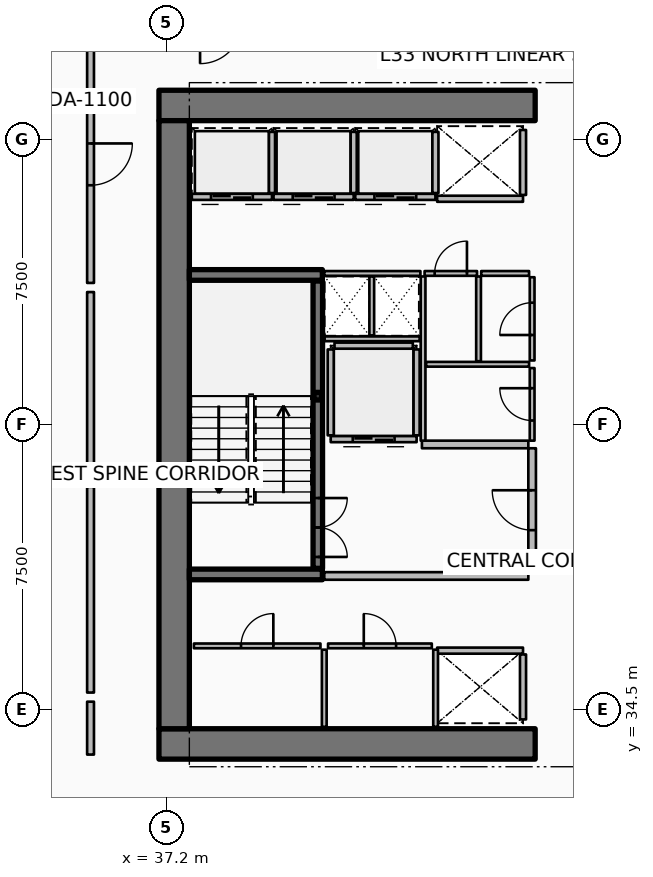
"""IFC4 building model, lengths in metres.
Left out: names, types, materials, properties, quantities, classifications, styles, units other than length and angle.
Written with IfcOpenShell. Run it as: python <this file> out.ifc"""

import sys

from ifc_helpers import new_model, si_unit, direction, frame, frame_2d, origin, origin_2d, place, context, subcontext, project, spatial, rectangle, hollow_rectangle, extrude, element, fill, save


model = new_model("IFC4")
c1 = context("Model", 3, precision=1e-05, world=origin(), true_north=direction((0.0, 1.0)))
c2 = subcontext(c1, "Body", "Model", "MODEL_VIEW")
j1 = project(units=[si_unit("LENGTHUNIT", "METRE"), si_unit("PLANEANGLEUNIT", "RADIAN")], contexts=[c1])
p1 = place(None, origin())
s1 = spatial("IfcSite", under=j1, at=p1, CompositionType="ELEMENT")
p2 = place(p1, origin())
s2 = spatial("IfcBuilding", under=s1, at=p2, CompositionType="ELEMENT")
p3 = place(p2, frame((0.0, 0.0, 135.3)))
s3 = spatial("IfcBuildingStorey", under=s2, at=p3, CompositionType="ELEMENT", Elevation=135.3)
for number, where, z_axis, x_axis in (
    (1, (37.0, 33.6, 0.0), (0.0, 0.0, 1.0), (1.0, 0.0, 0.0)),
    (2, (37.0, 50.4, 0.0), (0.0, 0.0, 1.0), (1.0, 0.0, 0.0)),
):
    element("IfcWall", number, at=place(p3, frame(where, z_axis=z_axis, x_axis=x_axis)), inside=s3, PredefinedType="SHEAR", context=c2, shape_type="SweptSolid", body=[
        extrude(rectangle(XDim=9.9, YDim=0.8, at=frame_2d((4.95, 0.0))), origin(), (0.0, 0.0, 1.0), 3.75),
    ])
p4 = place(p3, frame((37.4, 34.0, 0.0), z_axis=(0.0, 0.0, 1.0), x_axis=(0.0, 1.0, 0.0)))
e3 = element("IfcWall", 3, at=p4, inside=s3, PredefinedType="SHEAR", context=c2, shape_type="SweptSolid", body=[
    extrude(rectangle(XDim=16.0, YDim=0.8, at=frame_2d((8.0, 0.0))), origin(), (0.0, 0.0, 1.0), 3.75),
])
for number, where, z_axis, x_axis in (
    (4, (37.8, 38.06, 0.0), (0.0, 0.0, 1.0), (1.0, 0.0, 0.0)),
    (5, (37.8, 45.94, 0.0), (0.0, 0.0, 1.0), (1.0, 0.0, 0.0)),
):
    element("IfcWall", number, at=place(p3, frame(where, z_axis=z_axis, x_axis=x_axis)), inside=s3, PredefinedType="SHEAR", context=c2, shape_type="SweptSolid", body=[
        extrude(rectangle(XDim=3.5, YDim=0.28, at=frame_2d((1.75, 0.0))), origin(), (0.0, 0.0, 1.0), 3.75),
    ])
p5 = place(p3, frame((41.18, 42.75, 0.0), z_axis=(0.0, 0.0, 1.0), x_axis=(1.0, 0.0, 0.0)))
e6 = element("IfcColumn", 6, at=p5, inside=s3, PredefinedType="COLUMN", context=c2, shape_type="SweptSolid", body=[
    extrude(hollow_rectangle(XDim=0.2, YDim=0.2, WallThickness=0.01, InnerFilletRadius=0.01, OuterFilletRadius=0.02, at=origin_2d()), origin(), (0.0, 0.0, 1.0), 1.67),
])
p6 = place(p3, frame((41.18, 38.22, 0.0), z_axis=(0.0, 0.0, 1.0), x_axis=(0.0, 1.0, 0.0)))
e7 = element("IfcWall", 7, at=p6, inside=s3, PredefinedType="SOLIDWALL", context=c2, shape_type="SweptSolid", body=[
    extrude(rectangle(XDim=7.56, YDim=0.25, at=frame_2d((3.78, 0.0))), origin(), (0.0, 0.0, 1.0), 3.5),
])
p7 = place(p6, frame((0.3, 0.0, 0.0)))
e8 = element("IfcOpeningElement", 8, at=p7, cuts=e7, PredefinedType="OPENING", context=c2, shape_type="SweptSolid", body=[
    extrude(rectangle(XDim=1.55, YDim=2.15, at=frame_2d((0.775, 1.075))), frame((0.0, 0.135, 0.0), z_axis=(0.0, -1.0, 0.0), x_axis=(1.0, 0.0, 0.0)), (0.0, 0.0, 1.0), 0.27),
])
p8 = place(p3, frame((39.975, 47.995, 0.0), z_axis=(0.0, 0.0, 1.0), x_axis=(-1.0, 0.0, 0.0)))
e9 = element("IfcWall", 9, at=p8, inside=s3, PredefinedType="PARTITIONING", context=c2, shape_type="SweptSolid", body=[
    extrude(rectangle(XDim=2.11, YDim=0.16, at=frame_2d((1.055, 0.0))), origin(), (0.0, 0.0, 1.0), 3.5),
])
p9 = place(p8, frame((0.505, 0.0, 0.0)))
e10 = element("IfcOpeningElement", 10, at=p9, cuts=e9, PredefinedType="OPENING", context=c2, shape_type="SweptSolid", body=[
    extrude(rectangle(XDim=1.1, YDim=2.1, at=frame_2d((0.55, 1.05))), frame((0.0, 0.09, 0.0), z_axis=(0.0, -1.0, 0.0), x_axis=(1.0, 0.0, 0.0)), (0.0, 0.0, 1.0), 0.18),
])
p10 = place(p3, frame((39.975, 48.095, 0.0), z_axis=(0.0, 0.0, 1.0), x_axis=(0.0, 1.0, 0.0)))
e11 = element("IfcWall", 11, at=p10, inside=s3, PredefinedType="PARTITIONING", context=c2, shape_type="SweptSolid", body=[
    extrude(rectangle(XDim=1.61, YDim=0.16, at=frame_2d((0.805, 0.0))), origin(), (0.0, 0.0, 1.0), 3.5),
])
p11 = place(p3, frame((42.125, 47.995, 0.0), z_axis=(0.0, 0.0, 1.0), x_axis=(-1.0, 0.0, 0.0)))
e12 = element("IfcWall", 12, at=p11, inside=s3, PredefinedType="PARTITIONING", context=c2, shape_type="SweptSolid", body=[
    extrude(rectangle(XDim=2.11, YDim=0.16, at=frame_2d((1.055, 0.0))), origin(), (0.0, 0.0, 1.0), 3.5),
])
p12 = place(p11, frame((0.505, 0.0, 0.0)))
e13 = element("IfcOpeningElement", 13, at=p12, cuts=e12, PredefinedType="OPENING", context=c2, shape_type="SweptSolid", body=[
    extrude(rectangle(XDim=1.1, YDim=2.1, at=frame_2d((0.55, 1.05))), frame((0.0, 0.09, 0.0), z_axis=(0.0, -1.0, 0.0), x_axis=(1.0, 0.0, 0.0)), (0.0, 0.0, 1.0), 0.18),
])
p13 = place(p3, frame((42.125, 48.095, 0.0), z_axis=(0.0, 0.0, 1.0), x_axis=(0.0, 1.0, 0.0)))
e14 = element("IfcWall", 14, at=p13, inside=s3, PredefinedType="PARTITIONING", context=c2, shape_type="SweptSolid", body=[
    extrude(rectangle(XDim=1.61, YDim=0.16, at=frame_2d((0.805, 0.0))), origin(), (0.0, 0.0, 1.0), 3.5),
])
p14 = place(p3, frame((44.275, 47.995, 0.0), z_axis=(0.0, 0.0, 1.0), x_axis=(-1.0, 0.0, 0.0)))
e15 = element("IfcWall", 15, at=p14, inside=s3, PredefinedType="PARTITIONING", context=c2, shape_type="SweptSolid", body=[
    extrude(rectangle(XDim=2.11, YDim=0.16, at=frame_2d((1.055, 0.0))), origin(), (0.0, 0.0, 1.0), 3.5),
])
p15 = place(p14, frame((0.505, 0.0, 0.0)))
e16 = element("IfcOpeningElement", 16, at=p15, cuts=e15, PredefinedType="OPENING", context=c2, shape_type="SweptSolid", body=[
    extrude(rectangle(XDim=1.1, YDim=2.1, at=frame_2d((0.55, 1.05))), frame((0.0, 0.09, 0.0), z_axis=(0.0, -1.0, 0.0), x_axis=(1.0, 0.0, 0.0)), (0.0, 0.0, 1.0), 0.18),
])
p16 = place(p3, frame((44.275, 48.095, 0.0), z_axis=(0.0, 0.0, 1.0), x_axis=(0.0, 1.0, 0.0)))
e17 = element("IfcWall", 17, at=p16, inside=s3, PredefinedType="PARTITIONING", context=c2, shape_type="SweptSolid", body=[
    extrude(rectangle(XDim=1.61, YDim=0.16, at=frame_2d((0.805, 0.0))), origin(), (0.0, 0.0, 1.0), 3.5),
])
p17 = place(p3, frame((46.58, 47.945, 0.0), z_axis=(0.0, 0.0, 1.0), x_axis=(-1.0, 0.0, 0.0)))
e18 = element("IfcWall", 18, at=p17, inside=s3, PredefinedType="PARTITIONING", context=c2, shape_type="SweptSolid", body=[
    extrude(rectangle(XDim=2.26, YDim=0.16, at=frame_2d((1.13, 0.0))), origin(), (0.0, 0.0, 1.0), 3.5),
])
p18 = place(p3, frame((46.58, 48.045, 0.0), z_axis=(0.0, 0.0, 1.0), x_axis=(0.0, 1.0, 0.0)))
e19 = element("IfcWall", 19, at=p18, inside=s3, PredefinedType="PARTITIONING", context=c2, shape_type="SweptSolid", body=[
    extrude(rectangle(XDim=1.71, YDim=0.16, at=frame_2d((0.855, 0.0))), origin(), (0.0, 0.0, 1.0), 3.5),
])
p19 = place(p3, frame((44.32, 36.055, 0.0), z_axis=(0.0, 0.0, 1.0), x_axis=(1.0, 0.0, 0.0)))
e20 = element("IfcWall", 20, at=p19, inside=s3, PredefinedType="PARTITIONING", context=c2, shape_type="SweptSolid", body=[
    extrude(rectangle(XDim=2.26, YDim=0.16, at=frame_2d((1.13, 0.0))), origin(), (0.0, 0.0, 1.0), 3.5),
])
p20 = place(p3, frame((46.58, 34.245, 0.0), z_axis=(0.0, 0.0, 1.0), x_axis=(0.0, 1.0, 0.0)))
e21 = element("IfcWall", 21, at=p20, inside=s3, PredefinedType="PARTITIONING", context=c2, shape_type="SweptSolid", body=[
    extrude(rectangle(XDim=1.71, YDim=0.16, at=frame_2d((0.855, 0.0))), origin(), (0.0, 0.0, 1.0), 3.5),
])
p21 = place(p3, frame((43.78, 41.62, 0.0), z_axis=(0.0, 0.0, 1.0), x_axis=(-1.0, 0.0, 0.0)))
e22 = element("IfcWall", 22, at=p21, inside=s3, PredefinedType="PARTITIONING", context=c2, shape_type="SweptSolid", body=[
    extrude(rectangle(XDim=2.26, YDim=0.16, at=frame_2d((1.13, 0.0))), origin(), (0.0, 0.0, 1.0), 3.5),
])
p22 = place(p21, frame((0.58, 0.0, 0.0)))
e23 = element("IfcOpeningElement", 23, at=p22, cuts=e22, PredefinedType="OPENING", context=c2, shape_type="SweptSolid", body=[
    extrude(rectangle(XDim=1.1, YDim=2.1, at=frame_2d((0.55, 1.05))), frame((0.0, 0.09, 0.0), z_axis=(0.0, -1.0, 0.0), x_axis=(1.0, 0.0, 0.0)), (0.0, 0.0, 1.0), 0.18),
])
for number, where, z_axis, x_axis in (
    (24, (43.78, 41.72, 0.0), (0.0, 0.0, 1.0), (0.0, 1.0, 0.0)),
    (25, (41.52, 41.72, 0.0), (0.0, 0.0, 1.0), (0.0, 1.0, 0.0)),
):
    element("IfcWall", number, at=place(p3, frame(where, z_axis=z_axis, x_axis=x_axis)), inside=s3, PredefinedType="PARTITIONING", context=c2, shape_type="SweptSolid", body=[
        extrude(rectangle(XDim=2.26, YDim=0.16, at=frame_2d((1.13, 0.0))), origin(), (0.0, 0.0, 1.0), 3.5),
    ])
p23 = place(p3, frame((41.62, 44.08, 0.0), z_axis=(0.0, 0.0, 1.0), x_axis=(1.0, 0.0, 0.0)))
e26 = element("IfcWall", 26, at=p23, inside=s3, PredefinedType="PARTITIONING", context=c2, shape_type="SweptSolid", body=[
    extrude(rectangle(XDim=2.06, YDim=0.16, at=frame_2d((1.03, 0.0))), origin(), (0.0, 0.0, 1.0), 3.5),
])
for number, where, z_axis, x_axis in (
    (27, (44.28, 34.05, 0.0), (0.0, 0.0, 1.0), (0.0, 1.0, 0.0)),
    (28, (41.35, 34.05, 0.0), (0.0, 0.0, 1.0), (0.0, 1.0, 0.0)),
):
    element("IfcWall", number, at=place(p3, frame(where, z_axis=z_axis, x_axis=x_axis)), inside=s3, PredefinedType="PARTITIONING", context=c2, shape_type="SweptSolid", body=[
        extrude(rectangle(XDim=2.03, YDim=0.125, at=frame_2d((1.015, 0.0))), origin(), (0.0, 0.0, 1.0), 2.94),
    ])
p24 = place(p3, frame((37.92, 36.18, 0.0), z_axis=(0.0, 0.0, 1.0), x_axis=(1.0, 0.0, 0.0)))
e29 = element("IfcWall", 29, at=p24, inside=s3, PredefinedType="PARTITIONING", context=c2, shape_type="SweptSolid", body=[
    extrude(rectangle(XDim=3.33, YDim=0.125, at=frame_2d((1.665, 0.0))), origin(), (0.0, 0.0, 1.0), 2.94),
])
p25 = place(p24, frame((1.24, 0.0, 0.0)))
e30 = element("IfcOpeningElement", 30, at=p25, cuts=e29, PredefinedType="OPENING", context=c2, shape_type="SweptSolid", body=[
    extrude(rectangle(XDim=0.85, YDim=2.06, at=frame_2d((0.425, 1.03))), frame((0.0, 0.073, 0.0), z_axis=(0.0, -1.0, 0.0), x_axis=(1.0, 0.0, 0.0)), (0.0, 0.0, 1.0), 0.145),
])
p26 = place(p3, frame((41.45, 36.18, 0.0), z_axis=(0.0, 0.0, 1.0), x_axis=(1.0, 0.0, 0.0)))
e31 = element("IfcWall", 31, at=p26, inside=s3, PredefinedType="PARTITIONING", context=c2, shape_type="SweptSolid", body=[
    extrude(rectangle(XDim=2.73, YDim=0.125, at=frame_2d((1.365, 0.0))), origin(), (0.0, 0.0, 1.0), 2.94),
])
p27 = place(p26, frame((0.94, 0.0, 0.0)))
e32 = element("IfcOpeningElement", 32, at=p27, cuts=e31, PredefinedType="OPENING", context=c2, shape_type="SweptSolid", body=[
    extrude(rectangle(XDim=0.85, YDim=2.06, at=frame_2d((0.425, 1.03))), frame((0.0, 0.073, 0.0), z_axis=(0.0, -1.0, 0.0), x_axis=(1.0, 0.0, 0.0)), (0.0, 0.0, 1.0), 0.145),
])
p28 = place(p3, frame((41.35, 38.02, 0.0), z_axis=(0.0, 0.0, 1.0), x_axis=(1.0, 0.0, 0.0)))
e33 = element("IfcWall", 33, at=p28, inside=s3, PredefinedType="PARTITIONING", context=c2, shape_type="SweptSolid", body=[
    extrude(rectangle(XDim=5.37, YDim=0.2, at=frame_2d((2.685, 0.0))), origin(), (0.0, 0.0, 1.0), 3.5),
])
p29 = place(p3, frame((43.92, 41.48, 0.0), z_axis=(0.0, 0.0, 1.0), x_axis=(1.0, 0.0, 0.0)))
e34 = element("IfcWall", 34, at=p29, inside=s3, PredefinedType="PARTITIONING", context=c2, shape_type="SweptSolid", body=[
    extrude(rectangle(XDim=2.8, YDim=0.2, at=frame_2d((1.4, 0.0))), origin(), (0.0, 0.0, 1.0), 3.5),
])
p30 = place(p3, frame((46.82, 38.12, 0.0), z_axis=(0.0, 0.0, 1.0), x_axis=(0.0, 1.0, 0.0)))
e35 = element("IfcWall", 35, at=p30, inside=s3, PredefinedType="PARTITIONING", context=c2, shape_type="SweptSolid", body=[
    extrude(rectangle(XDim=3.26, YDim=0.2, at=frame_2d((1.63, 0.0))), origin(), (0.0, 0.0, 1.0), 3.5),
])
p31 = place(p30, frame((1.105, 0.0, 0.0)))
e36 = element("IfcOpeningElement", 36, at=p31, cuts=e35, PredefinedType="OPENING", context=c2, shape_type="SweptSolid", body=[
    extrude(rectangle(XDim=1.05, YDim=2.1, at=frame_2d((0.525, 1.05))), frame((0.0, 0.11, 0.0), z_axis=(0.0, -1.0, 0.0), x_axis=(1.0, 0.0, 0.0)), (0.0, 0.0, 1.0), 0.22),
])
p32 = place(p3, frame((41.36, 44.26, 0.0), z_axis=(0.0, 0.0, 1.0), x_axis=(1.0, 0.0, 0.0)))
e37 = element("IfcWall", 37, at=p32, inside=s3, PredefinedType="PARTITIONING", context=c2, shape_type="SweptSolid", body=[
    extrude(rectangle(XDim=2.5, YDim=0.125, at=frame_2d((1.25, 0.0))), origin(), (0.0, 0.0, 1.0), 2.94),
])
p33 = place(p3, frame((42.6, 44.35, 0.0), z_axis=(0.0, 0.0, 1.0), x_axis=(0.0, 1.0, 0.0)))
e38 = element("IfcWall", 38, at=p33, inside=s3, PredefinedType="PARTITIONING", context=c2, shape_type="SweptSolid", body=[
    extrude(rectangle(XDim=1.55, YDim=0.125, at=frame_2d((0.775, 0.0))), origin(), (0.0, 0.0, 1.0), 2.94),
])
p34 = place(p3, frame((43.95, 41.58, 0.0), z_axis=(0.0, 0.0, 1.0), x_axis=(0.0, 1.0, 0.0)))
e39 = element("IfcWall", 39, at=p34, inside=s3, PredefinedType="PARTITIONING", context=c2, shape_type="SweptSolid", body=[
    extrude(rectangle(XDim=4.32, YDim=0.125, at=frame_2d((2.16, 0.0))), origin(), (0.0, 0.0, 1.0), 2.94),
])
p35 = place(p3, frame((44.03, 43.59, 0.0), z_axis=(0.0, 0.0, 1.0), x_axis=(1.0, 0.0, 0.0)))
e40 = element("IfcWall", 40, at=p35, inside=s3, PredefinedType="PARTITIONING", context=c2, shape_type="SweptSolid", body=[
    extrude(rectangle(XDim=2.71, YDim=0.125, at=frame_2d((1.355, 0.0))), origin(), (0.0, 0.0, 1.0), 2.94),
])
p36 = place(p3, frame((45.41, 43.67, 0.0), z_axis=(0.0, 0.0, 1.0), x_axis=(0.0, 1.0, 0.0)))
e41 = element("IfcWall", 41, at=p36, inside=s3, PredefinedType="PARTITIONING", context=c2, shape_type="SweptSolid", body=[
    extrude(rectangle(XDim=2.23, YDim=0.125, at=frame_2d((1.115, 0.0))), origin(), (0.0, 0.0, 1.0), 2.94),
])
p37 = place(p3, frame((46.82, 41.58, 0.0), z_axis=(0.0, 0.0, 1.0), x_axis=(0.0, 1.0, 0.0)))
e42 = element("IfcWall", 42, at=p37, inside=s3, PredefinedType="PARTITIONING", context=c2, shape_type="SweptSolid", body=[
    extrude(rectangle(XDim=1.91, YDim=0.125, at=frame_2d((0.955, 0.0))), origin(), (0.0, 0.0, 1.0), 2.94),
])
p38 = place(p37, frame((0.53, 0.0, 0.0)))
e43 = element("IfcOpeningElement", 43, at=p38, cuts=e42, PredefinedType="OPENING", context=c2, shape_type="SweptSolid", body=[
    extrude(rectangle(XDim=0.85, YDim=2.06, at=frame_2d((0.425, 1.03))), frame((0.0, 0.073, 0.0), z_axis=(0.0, -1.0, 0.0), x_axis=(1.0, 0.0, 0.0)), (0.0, 0.0, 1.0), 0.145),
])
p39 = place(p3, frame((46.82, 43.69, 0.0), z_axis=(0.0, 0.0, 1.0), x_axis=(0.0, 1.0, 0.0)))
e44 = element("IfcWall", 44, at=p39, inside=s3, PredefinedType="PARTITIONING", context=c2, shape_type="SweptSolid", body=[
    extrude(rectangle(XDim=2.19, YDim=0.125, at=frame_2d((1.095, 0.0))), origin(), (0.0, 0.0, 1.0), 2.94),
])
p40 = place(p39, frame((0.67, 0.0, 0.0)))
e45 = element("IfcOpeningElement", 45, at=p40, cuts=e44, PredefinedType="OPENING", context=c2, shape_type="SweptSolid", body=[
    extrude(rectangle(XDim=0.85, YDim=2.06, at=frame_2d((0.425, 1.03))), frame((0.0, 0.073, 0.0), z_axis=(0.0, -1.0, 0.0), x_axis=(1.0, 0.0, 0.0)), (0.0, 0.0, 1.0), 0.145),
])
p41 = place(p3, frame((41.35, 45.98, 0.0), z_axis=(0.0, 0.0, 1.0), x_axis=(1.0, 0.0, 0.0)))
e46 = element("IfcWall", 46, at=p41, inside=s3, PredefinedType="PARTITIONING", context=c2, shape_type="SweptSolid", body=[
    extrude(rectangle(XDim=2.53, YDim=0.125, at=frame_2d((1.265, 0.0))), origin(), (0.0, 0.0, 1.0), 2.94),
])
p42 = place(p3, frame((43.99, 45.98, 0.0), z_axis=(0.0, 0.0, 1.0), x_axis=(1.0, 0.0, 0.0)))
e47 = element("IfcWall", 47, at=p42, inside=s3, PredefinedType="PARTITIONING", context=c2, shape_type="SweptSolid", body=[
    extrude(rectangle(XDim=1.38, YDim=0.125, at=frame_2d((0.69, 0.0))), origin(), (0.0, 0.0, 1.0), 2.94),
])
p43 = place(p42, frame((0.265, 0.0, 0.0)))
e48 = element("IfcOpeningElement", 48, at=p43, cuts=e47, PredefinedType="OPENING", context=c2, shape_type="SweptSolid", body=[
    extrude(rectangle(XDim=0.85, YDim=2.06, at=frame_2d((0.425, 1.03))), frame((0.0, 0.073, 0.0), z_axis=(0.0, -1.0, 0.0), x_axis=(1.0, 0.0, 0.0)), (0.0, 0.0, 1.0), 0.145),
])
p44 = place(p3, frame((45.48, 45.98, 0.0), z_axis=(0.0, 0.0, 1.0), x_axis=(1.0, 0.0, 0.0)))
e49 = element("IfcWall", 49, at=p44, inside=s3, PredefinedType="PARTITIONING", context=c2, shape_type="SweptSolid", body=[
    extrude(rectangle(XDim=1.26, YDim=0.125, at=frame_2d((0.63, 0.0))), origin(), (0.0, 0.0, 1.0), 2.94),
])
p45 = place(p3, frame((35.2, 51.971, 0.0), z_axis=(0.0, 0.0, 1.0), x_axis=(0.0, -1.0, 0.0)))
e50 = element("IfcWall", 50, at=p45, inside=s3, PredefinedType="PARTITIONING", context=c2, shape_type="SweptSolid", body=[
    extrude(rectangle(XDim=6.241, YDim=0.18, at=frame_2d((3.12, 0.0))), origin(), (0.0, 0.0, 1.0), 2.94),
])
p46 = place(p45, frame((2.57, 0.0, 0.0)))
e51 = element("IfcOpeningElement", 51, at=p46, cuts=e50, PredefinedType="OPENING", context=c2, shape_type="SweptSolid", body=[
    extrude(rectangle(XDim=1.1, YDim=2.1, at=frame_2d((0.55, 1.05))), frame((0.0, 0.1, 0.0), z_axis=(0.0, -1.0, 0.0), x_axis=(1.0, 0.0, 0.0)), (0.0, 0.0, 1.0), 0.2),
])
p47 = place(p3, frame((35.2, 45.49, 0.0), z_axis=(0.0, 0.0, 1.0), x_axis=(0.0, -1.0, 0.0)))
e52 = element("IfcWall", 52, at=p47, inside=s3, PredefinedType="PARTITIONING", context=c2, shape_type="SweptSolid", body=[
    extrude(rectangle(XDim=4.885, YDim=0.18, at=frame_2d((2.442, 0.0))), origin(), (0.0, 0.0, 1.0), 2.94),
])
p48 = place(p3, frame((35.2, 40.365, 0.0), z_axis=(0.0, 0.0, 1.0), x_axis=(0.0, -1.0, 0.0)))
e53 = element("IfcWall", 53, at=p48, inside=s3, PredefinedType="PARTITIONING", context=c2, shape_type="SweptSolid", body=[
    extrude(rectangle(XDim=5.413, YDim=0.18, at=frame_2d((2.707, 0.0))), origin(), (0.0, 0.0, 1.0), 2.94),
])
p49 = place(p3, frame((35.2, 34.712, 0.0), z_axis=(0.0, 0.0, 1.0), x_axis=(0.0, -1.0, 0.0)))
e54 = element("IfcWall", 54, at=p49, inside=s3, PredefinedType="PARTITIONING", context=c2, shape_type="SweptSolid", body=[
    extrude(rectangle(XDim=1.392, YDim=0.18, at=frame_2d((0.696, 0.0))), origin(), (0.0, 0.0, 1.0), 2.94),
])
p50 = place(p7, origin())
e55 = element("IfcDoor", 55, at=p50, inside=s3, OperationType="DOUBLE_DOOR_SINGLE_SWING", PredefinedType="DOOR", context=c2, shape_type="SweptSolid", body=[
    extrude(rectangle(XDim=1.55, YDim=2.15, at=frame_2d((0.775, 1.075))), frame((0.0, 0.025, 0.0), z_axis=(0.0, -1.0, 0.0), x_axis=(1.0, 0.0, 0.0)), (0.0, 0.0, 1.0), 0.05),
])
fill(e8, e55)
p51 = place(p9, origin())
e56 = element("IfcDoor", 56, at=p51, inside=s3, OperationType="DOUBLE_DOOR_SLIDING", PredefinedType="DOOR", context=c2, shape_type="SweptSolid", body=[
    extrude(rectangle(XDim=1.1, YDim=2.1, at=frame_2d((0.55, 1.05))), frame((0.0, 0.025, 0.0), z_axis=(0.0, -1.0, 0.0), x_axis=(1.0, 0.0, 0.0)), (0.0, 0.0, 1.0), 0.05),
])
fill(e10, e56)
p52 = place(p12, origin())
e57 = element("IfcDoor", 57, at=p52, inside=s3, OperationType="DOUBLE_DOOR_SLIDING", PredefinedType="DOOR", context=c2, shape_type="SweptSolid", body=[
    extrude(rectangle(XDim=1.1, YDim=2.1, at=frame_2d((0.55, 1.05))), frame((0.0, 0.025, 0.0), z_axis=(0.0, -1.0, 0.0), x_axis=(1.0, 0.0, 0.0)), (0.0, 0.0, 1.0), 0.05),
])
fill(e13, e57)
p53 = place(p15, origin())
e58 = element("IfcDoor", 58, at=p53, inside=s3, OperationType="DOUBLE_DOOR_SLIDING", PredefinedType="DOOR", context=c2, shape_type="SweptSolid", body=[
    extrude(rectangle(XDim=1.1, YDim=2.1, at=frame_2d((0.55, 1.05))), frame((0.0, 0.025, 0.0), z_axis=(0.0, -1.0, 0.0), x_axis=(1.0, 0.0, 0.0)), (0.0, 0.0, 1.0), 0.05),
])
fill(e16, e58)
p54 = place(p22, origin())
e59 = element("IfcDoor", 59, at=p54, inside=s3, OperationType="DOUBLE_DOOR_SLIDING", PredefinedType="DOOR", context=c2, shape_type="SweptSolid", body=[
    extrude(rectangle(XDim=1.1, YDim=2.1, at=frame_2d((0.55, 1.05))), frame((0.0, 0.025, 0.0), z_axis=(0.0, -1.0, 0.0), x_axis=(1.0, 0.0, 0.0)), (0.0, 0.0, 1.0), 0.05),
])
fill(e23, e59)
p55 = place(p25, origin())
e60 = element("IfcDoor", 60, at=p55, inside=s3, OperationType="SINGLE_SWING_RIGHT", PredefinedType="DOOR", context=c2, shape_type="SweptSolid", body=[
    extrude(rectangle(XDim=0.85, YDim=2.06, at=frame_2d((0.425, 1.03))), frame((0.0, 0.025, 0.0), z_axis=(0.0, -1.0, 0.0), x_axis=(1.0, 0.0, 0.0)), (0.0, 0.0, 1.0), 0.05),
])
fill(e30, e60)
p56 = place(p27, origin())
e61 = element("IfcDoor", 61, at=p56, inside=s3, OperationType="SINGLE_SWING_LEFT", PredefinedType="DOOR", context=c2, shape_type="SweptSolid", body=[
    extrude(rectangle(XDim=0.85, YDim=2.06, at=frame_2d((0.425, 1.03))), frame((0.0, 0.025, 0.0), z_axis=(0.0, -1.0, 0.0), x_axis=(1.0, 0.0, 0.0)), (0.0, 0.0, 1.0), 0.05),
])
fill(e32, e61)
p57 = place(p31, origin())
e62 = element("IfcDoor", 62, at=p57, inside=s3, OperationType="SINGLE_SWING_RIGHT", PredefinedType="DOOR", context=c2, shape_type="SweptSolid", body=[
    extrude(rectangle(XDim=1.05, YDim=2.1, at=frame_2d((0.525, 1.05))), frame((0.0, 0.025, 0.0), z_axis=(0.0, -1.0, 0.0), x_axis=(1.0, 0.0, 0.0)), (0.0, 0.0, 1.0), 0.05),
])
fill(e36, e62)
p58 = place(p38, origin())
e63 = element("IfcDoor", 63, at=p58, inside=s3, OperationType="SINGLE_SWING_RIGHT", PredefinedType="DOOR", context=c2, shape_type="SweptSolid", body=[
    extrude(rectangle(XDim=0.85, YDim=2.06, at=frame_2d((0.425, 1.03))), frame((0.0, 0.025, 0.0), z_axis=(0.0, -1.0, 0.0), x_axis=(1.0, 0.0, 0.0)), (0.0, 0.0, 1.0), 0.05),
])
fill(e43, e63)
p59 = place(p40, origin())
e64 = element("IfcDoor", 64, at=p59, inside=s3, OperationType="SINGLE_SWING_LEFT", PredefinedType="DOOR", context=c2, shape_type="SweptSolid", body=[
    extrude(rectangle(XDim=0.85, YDim=2.06, at=frame_2d((0.425, 1.03))), frame((0.0, 0.025, 0.0), z_axis=(0.0, -1.0, 0.0), x_axis=(1.0, 0.0, 0.0)), (0.0, 0.0, 1.0), 0.05),
])
fill(e45, e64)
p60 = place(p43, origin())
e65 = element("IfcDoor", 65, at=p60, inside=s3, OperationType="SINGLE_SWING_RIGHT", PredefinedType="DOOR", context=c2, shape_type="SweptSolid", body=[
    extrude(rectangle(XDim=0.85, YDim=2.06, at=frame_2d((0.425, 1.03))), frame((0.0, 0.025, 0.0), z_axis=(0.0, -1.0, 0.0), x_axis=(1.0, 0.0, 0.0)), (0.0, 0.0, 1.0), 0.05),
])
fill(e48, e65)
p61 = place(p46, origin())
e66 = element("IfcDoor", 66, at=p61, inside=s3, OperationType="SINGLE_SWING_LEFT", PredefinedType="DOOR", context=c2, shape_type="SweptSolid", body=[
    extrude(rectangle(XDim=1.1, YDim=2.1, at=frame_2d((0.55, 1.05))), frame((0.0, 0.025, 0.0), z_axis=(0.0, -1.0, 0.0), x_axis=(1.0, 0.0, 0.0)), (0.0, 0.0, 1.0), 0.05),
])
fill(e51, e66)
save(model, sys.argv[1])
